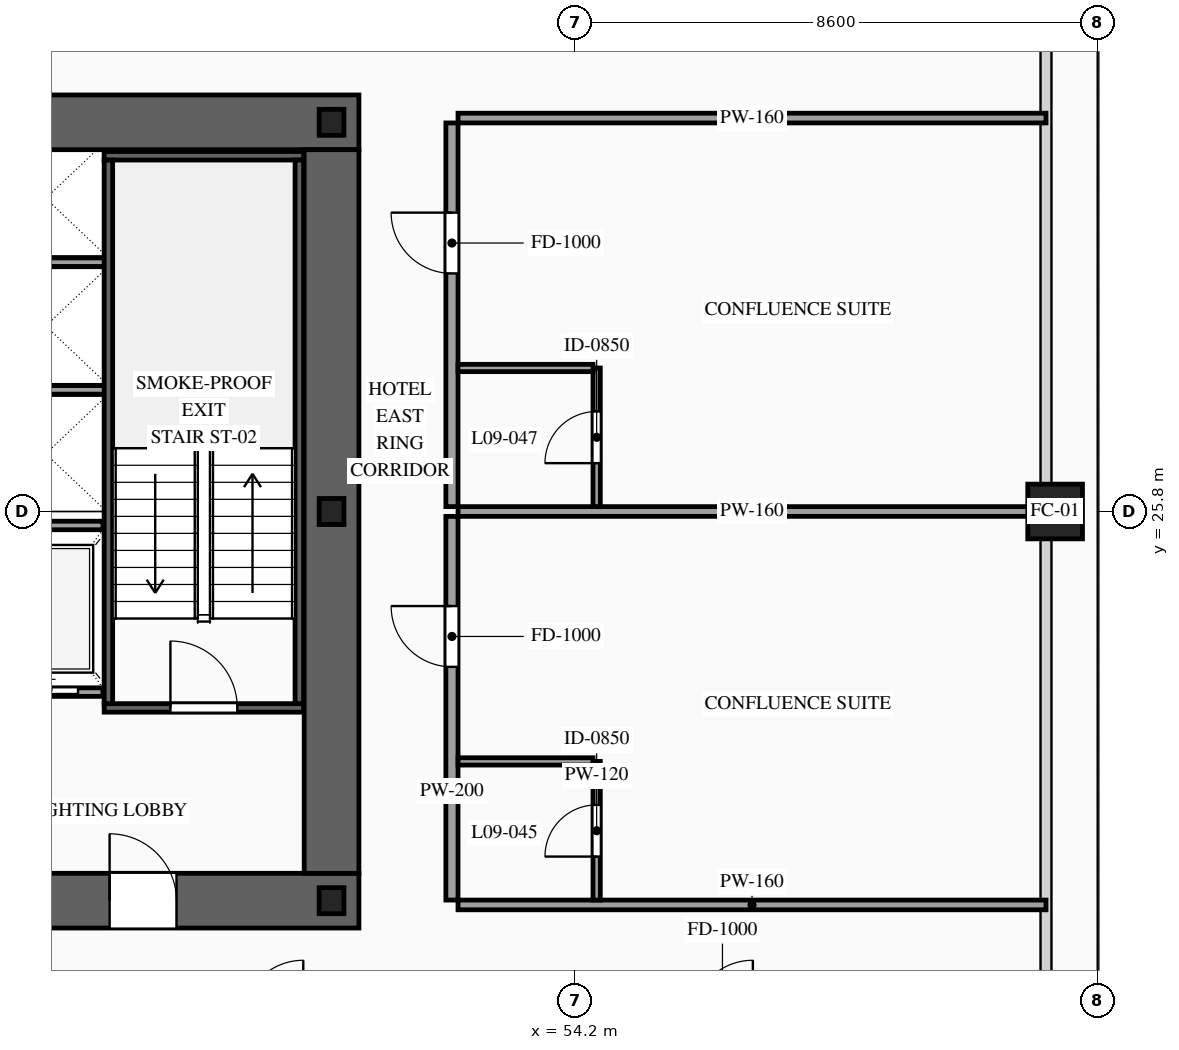
"""IFC4 building model, lengths in metres.
Left out: names, types, materials, properties, quantities, classifications, styles, units other than length and angle.
Written with IfcOpenShell. Run it as: python <this file> out.ifc"""

import sys

from ifc_helpers import new_model, si_unit, direction, frame, frame_2d, origin, origin_2d, place, context, subcontext, project, spatial, rectangle, hollow_rectangle, i_section, extrude, source, transform, mapped, element, fill, save


model = new_model("IFC4")
c1 = context("Model", 3, precision=1e-05, world=origin(), true_north=direction((0.0, 1.0)))
c2 = subcontext(c1, "Body", "Model", "MODEL_VIEW")
j1 = project(units=[si_unit("LENGTHUNIT", "METRE"), si_unit("PLANEANGLEUNIT", "RADIAN")], contexts=[c1])
p1 = place(None, origin())
s1 = spatial("IfcSite", under=j1, at=p1, CompositionType="ELEMENT")
p2 = place(p1, origin())
s2 = spatial("IfcBuilding", under=s1, at=p2, CompositionType="ELEMENT")
p3 = place(p2, frame((0.0, 0.0, 37.8)))
s3 = spatial("IfcBuildingStorey", under=s2, at=p3, CompositionType="ELEMENT", Elevation=37.8)
p4 = place(p3, frame((23.35, 19.4, 0.0), z_axis=(0.0, 0.0, 1.0), x_axis=(1.0, 0.0, 0.0)))
e1 = element("IfcWall", 1, at=p4, inside=s3, PredefinedType="SHEAR", context=c2, shape_type="SweptSolid", body=[
    extrude(rectangle(XDim=27.3, YDim=0.9, at=frame_2d((13.65, 0.0))), origin(), (0.0, 0.0, 1.0), 3.6),
])
p5 = place(p4, frame((2.1, 0.0, 0.0)))
e2 = element("IfcOpeningElement", 2, at=p5, cuts=e1, PredefinedType="OPENING", context=c2, shape_type="SweptSolid", body=[
    extrude(rectangle(XDim=1.1, YDim=2.2, at=frame_2d((0.55, 1.1))), frame((0.0, 0.465, 0.0), z_axis=(0.0, -1.0, 0.0), x_axis=(1.0, 0.0, 0.0)), (0.0, 0.0, 1.0), 0.93),
])
p6 = place(p4, frame((10.0, 0.0, 0.0)))
e3 = element("IfcOpeningElement", 3, at=p6, cuts=e1, PredefinedType="OPENING", context=c2, shape_type="SweptSolid", body=[
    extrude(rectangle(XDim=1.1, YDim=2.2, at=frame_2d((0.55, 1.1))), frame((0.0, 0.465, 0.0), z_axis=(0.0, -1.0, 0.0), x_axis=(1.0, 0.0, 0.0)), (0.0, 0.0, 1.0), 0.93),
])
p7 = place(p4, frame((23.2, 0.0, 0.0)))
e4 = element("IfcOpeningElement", 4, at=p7, cuts=e1, PredefinedType="OPENING", context=c2, shape_type="SweptSolid", body=[
    extrude(rectangle(XDim=1.1, YDim=2.2, at=frame_2d((0.55, 1.1))), frame((0.0, 0.465, 0.0), z_axis=(0.0, -1.0, 0.0), x_axis=(1.0, 0.0, 0.0)), (0.0, 0.0, 1.0), 0.93),
])
p8 = place(p4, frame((19.82, 0.0, 0.0)))
e5 = element("IfcOpeningElement", 5, at=p8, cuts=e1, PredefinedType="OPENING", context=c2, shape_type="SweptSolid", body=[
    extrude(rectangle(XDim=0.9, YDim=2.15, at=frame_2d((0.45, 1.075))), frame((0.0, 0.465, 0.0), z_axis=(0.0, -1.0, 0.0), x_axis=(1.0, 0.0, 0.0)), (0.0, 0.0, 1.0), 0.93),
])
p9 = place(p4, frame((18.38, 0.0, 0.0)))
e6 = element("IfcOpeningElement", 6, at=p9, cuts=e1, PredefinedType="OPENING", context=c2, shape_type="SweptSolid", body=[
    extrude(rectangle(XDim=0.9, YDim=2.15, at=frame_2d((0.45, 1.075))), frame((0.0, 0.465, 0.0), z_axis=(0.0, -1.0, 0.0), x_axis=(1.0, 0.0, 0.0)), (0.0, 0.0, 1.0), 0.93),
])
p10 = place(p3, frame((23.35, 32.2, 0.0), z_axis=(0.0, 0.0, 1.0), x_axis=(1.0, 0.0, 0.0)))
e7 = element("IfcWall", 7, at=p10, inside=s3, PredefinedType="SHEAR", context=c2, shape_type="SweptSolid", body=[
    extrude(rectangle(XDim=27.3, YDim=0.9, at=frame_2d((13.65, 0.0))), origin(), (0.0, 0.0, 1.0), 3.6),
])
p11 = place(p10, frame((4.72, 0.0, 0.0)))
e8 = element("IfcOpeningElement", 8, at=p11, cuts=e7, PredefinedType="OPENING", context=c2, shape_type="SweptSolid", body=[
    extrude(rectangle(XDim=0.9, YDim=2.15, at=frame_2d((0.45, 1.075))), frame((0.0, 0.465, 0.0), z_axis=(0.0, -1.0, 0.0), x_axis=(1.0, 0.0, 0.0)), (0.0, 0.0, 1.0), 0.93),
])
p12 = place(p10, frame((10.0, 0.0, 0.0)))
e9 = element("IfcOpeningElement", 9, at=p12, cuts=e7, PredefinedType="OPENING", context=c2, shape_type="SweptSolid", body=[
    extrude(rectangle(XDim=1.1, YDim=2.2, at=frame_2d((0.55, 1.1))), frame((0.0, 0.465, 0.0), z_axis=(0.0, -1.0, 0.0), x_axis=(1.0, 0.0, 0.0)), (0.0, 0.0, 1.0), 0.93),
])
p13 = place(p10, frame((15.85, 0.0, 0.0)))
e10 = element("IfcOpeningElement", 10, at=p13, cuts=e7, PredefinedType="OPENING", context=c2, shape_type="SweptSolid", body=[
    extrude(rectangle(XDim=1.1, YDim=2.2, at=frame_2d((0.55, 1.1))), frame((0.0, 0.465, 0.0), z_axis=(0.0, -1.0, 0.0), x_axis=(1.0, 0.0, 0.0)), (0.0, 0.0, 1.0), 0.93),
])
m1 = source(origin(), c2, "Body", "SweptSolid", [
    extrude(rectangle(XDim=11.9, YDim=0.9, at=frame_2d((5.95, 0.0))), origin(), (0.0, 0.0, 1.0), 3.6),
])
p14 = place(p3, frame((50.2, 19.85, 0.0), z_axis=(0.0, 0.0, 1.0), x_axis=(0.0, 1.0, 0.0)))
e11 = element("IfcWall", 11, at=p14, inside=s3, PredefinedType="SHEAR", context=c2, shape_type="MappedRepresentation", body=[
    mapped(m1, transform((0.0, 0.0, 0.0), scale=1.0)),
])
m2 = source(origin(), c2, "Body", "SweptSolid", [
    extrude(i_section(OverallWidth=0.407, OverallDepth=0.428, WebThickness=0.02, FlangeThickness=0.035, at=origin_2d()), origin(), (0.0, 0.0, 1.0), 3.6),
])
for number, where, z_axis, x_axis in (
    (12, (50.2, 19.4, 0.0), (0.0, 0.0, 1.0), (1.0, 0.0, 0.0)),
    (13, (50.2, 25.8, 0.0), (0.0, 0.0, 1.0), (1.0, 0.0, 0.0)),
    (14, (50.2, 32.2, 0.0), (0.0, 0.0, 1.0), (1.0, 0.0, 0.0)),
):
    element("IfcColumn", number, at=place(p3, frame(where, z_axis=z_axis, x_axis=x_axis)), inside=s3, PredefinedType="COLUMN", context=c2, shape_type="MappedRepresentation", body=[
        mapped(m2, transform((0.0, 0.0, 0.0), scale=1.0)),
    ])
m3 = source(origin(), c2, "Body", "SweptSolid", [
    extrude(hollow_rectangle(XDim=0.9, YDim=0.9, WallThickness=0.042, at=origin_2d()), origin(), (0.0, 0.0, 1.0), 3.6),
])
p15 = place(p3, frame((62.1, 25.8, 0.0), z_axis=(0.0, 0.0, 1.0), x_axis=(1.0, 0.0, 0.0)))
e15 = element("IfcColumn", 15, at=p15, inside=s3, PredefinedType="COLUMN", context=c2, shape_type="MappedRepresentation", body=[
    mapped(m3, transform((0.0, 0.0, 0.0), scale=1.0)),
])
p16 = place(p3, frame((44.52, 22.83, 0.0), z_axis=(0.0, 0.0, 1.0), x_axis=(1.0, 0.0, 0.0)))
e16 = element("IfcWall", 16, at=p16, inside=s3, PredefinedType="SOLIDWALL", context=c2, shape_type="SweptSolid", body=[
    extrude(rectangle(XDim=1.92, YDim=0.14, at=frame_2d((0.96, 0.0))), origin(), (0.0, 0.0, 1.0), 3.32),
])
p17 = place(p16, frame((0.41, 0.0, 0.0)))
e17 = element("IfcOpeningElement", 17, at=p17, cuts=e16, PredefinedType="OPENING", context=c2, shape_type="SweptSolid", body=[
    extrude(rectangle(XDim=1.1, YDim=2.2, at=frame_2d((0.55, 1.1))), frame((0.0, 0.085, 0.0), z_axis=(0.0, -1.0, 0.0), x_axis=(1.0, 0.0, 0.0)), (0.0, 0.0, 1.0), 0.17),
])
m4 = source(origin(), c2, "Body", "SweptSolid", [
    extrude(rectangle(XDim=1.92, YDim=0.14, at=frame_2d((0.96, 0.0))), origin(), (0.0, 0.0, 1.0), 3.32),
])
p18 = place(p3, frame((44.52, 25.57, 0.0), z_axis=(0.0, 0.0, 1.0), x_axis=(1.0, 0.0, 0.0)))
e18 = element("IfcWall", 18, at=p18, inside=s3, PredefinedType="SOLIDWALL", context=c2, shape_type="MappedRepresentation", body=[
    mapped(m4, transform((0.0, 0.0, 0.0), scale=1.0)),
])
m5 = source(origin(), c2, "Body", "SweptSolid", [
    extrude(rectangle(XDim=2.0, YDim=0.14, at=frame_2d((1.0, 0.0))), origin(), (0.0, 0.0, 1.0), 3.32),
])
for number, where, z_axis, x_axis in (
    (19, (44.5, 27.8, 0.0), (0.0, 0.0, 1.0), (1.0, 0.0, 0.0)),
    (20, (44.5, 29.9, 0.0), (0.0, 0.0, 1.0), (1.0, 0.0, 0.0)),
):
    element("IfcWall", number, at=place(p3, frame(where, z_axis=z_axis, x_axis=x_axis)), inside=s3, PredefinedType="SOLIDWALL", context=c2, shape_type="MappedRepresentation", body=[
        mapped(m5, transform((0.0, 0.0, 0.0), scale=1.0)),
    ])
p19 = place(p3, frame((46.46, 22.57, 0.0), z_axis=(0.0, 0.0, 1.0), x_axis=(1.0, 0.0, 0.0)))
e21 = element("IfcWall", 21, at=p19, inside=s3, PredefinedType="SOLIDWALL", context=c2, shape_type="SweptSolid", body=[
    extrude(rectangle(XDim=3.28, YDim=0.14, at=frame_2d((1.64, 0.0))), origin(), (0.0, 0.0, 1.0), 3.32),
])
p20 = place(p19, frame((1.09, 0.0, 0.0)))
e22 = element("IfcOpeningElement", 22, at=p20, cuts=e21, PredefinedType="OPENING", context=c2, shape_type="SweptSolid", body=[
    extrude(rectangle(XDim=1.1, YDim=2.2, at=frame_2d((0.55, 1.1))), frame((0.0, 0.085, 0.0), z_axis=(0.0, -1.0, 0.0), x_axis=(1.0, 0.0, 0.0)), (0.0, 0.0, 1.0), 0.17),
])
m6 = source(origin(), c2, "Body", "SweptSolid", [
    extrude(rectangle(XDim=3.28, YDim=0.14, at=frame_2d((1.64, 0.0))), origin(), (0.0, 0.0, 1.0), 3.32),
])
p21 = place(p3, frame((46.46, 31.65, 0.0), z_axis=(0.0, 0.0, 1.0), x_axis=(1.0, 0.0, 0.0)))
e23 = element("IfcWall", 23, at=p21, inside=s3, PredefinedType="SOLIDWALL", context=c2, shape_type="MappedRepresentation", body=[
    mapped(m6, transform((0.0, 0.0, 0.0), scale=1.0)),
])
m7 = source(origin(), c2, "Body", "SweptSolid", [
    extrude(rectangle(XDim=8.94, YDim=0.14, at=frame_2d((4.47, 0.0))), origin(), (0.0, 0.0, 1.0), 3.32),
])
for number, where, z_axis, x_axis in (
    (24, (46.53, 22.64, 0.0), (0.0, 0.0, 1.0), (0.0, 1.0, 0.0)),
    (25, (49.67, 22.64, 0.0), (0.0, 0.0, 1.0), (0.0, 1.0, 0.0)),
):
    element("IfcWall", number, at=place(p3, frame(where, z_axis=z_axis, x_axis=x_axis)), inside=s3, PredefinedType="SOLIDWALL", context=c2, shape_type="MappedRepresentation", body=[
        mapped(m7, transform((0.0, 0.0, 0.0), scale=1.0)),
    ])
p22 = place(p3, frame((52.18, 19.41, 0.0), z_axis=(0.0, 0.0, 1.0), x_axis=(0.0, 1.0, 0.0)))
e26 = element("IfcWall", 26, at=p22, inside=s3, PredefinedType="PARTITIONING", context=c2, shape_type="SweptSolid", body=[
    extrude(rectangle(XDim=6.31, YDim=0.2, at=frame_2d((3.155, 0.0))), origin(), (0.0, 0.0, 1.0), 3.32),
])
p23 = place(p22, frame((3.835, 0.0, 0.0)))
e27 = element("IfcOpeningElement", 27, at=p23, cuts=e26, PredefinedType="OPENING", context=c2, shape_type="SweptSolid", body=[
    extrude(rectangle(XDim=1.0, YDim=2.2, at=frame_2d((0.5, 1.1))), frame((0.0, 0.115, 0.0), z_axis=(0.0, -1.0, 0.0), x_axis=(1.0, 0.0, 0.0)), (0.0, 0.0, 1.0), 0.23),
])
m8 = source(origin(), c2, "Body", "SweptSolid", [
    extrude(rectangle(XDim=9.67, YDim=0.16, at=frame_2d((4.835, 0.0))), origin(), (0.0, 0.0, 1.0), 2.515),
])
p24 = place(p3, frame((52.28, 25.8, 0.0), z_axis=(0.0, 0.0, 1.0), x_axis=(1.0, 0.0, 0.0)))
e28 = element("IfcWall", 28, at=p24, inside=s3, PredefinedType="PARTITIONING", context=c2, shape_type="MappedRepresentation", body=[
    mapped(m8, transform((0.0, 0.0, 0.0), scale=1.0)),
])
m9 = source(origin(), c2, "Body", "SweptSolid", [
    extrude(rectangle(XDim=9.67, YDim=0.16, at=frame_2d((4.835, 0.0))), origin(), (0.0, 0.0, 1.0), 2.815),
])
p25 = place(p3, frame((52.28, 19.33, 0.0), z_axis=(0.0, 0.0, 1.0), x_axis=(1.0, 0.0, 0.0)))
e29 = element("IfcWall", 29, at=p25, inside=s3, PredefinedType="PARTITIONING", context=c2, shape_type="MappedRepresentation", body=[
    mapped(m9, transform((0.0, 0.0, 0.0), scale=1.0)),
])
p26 = place(p3, frame((54.56, 19.41, 0.0), z_axis=(0.0, 0.0, 1.0), x_axis=(0.0, 1.0, 0.0)))
e30 = element("IfcWall", 30, at=p26, inside=s3, PredefinedType="PARTITIONING", context=c2, shape_type="SweptSolid", body=[
    extrude(rectangle(XDim=2.28, YDim=0.12, at=frame_2d((1.14, 0.0))), origin(), (0.0, 0.0, 1.0), 3.32),
])
p27 = place(p26, frame((0.715, 0.0, 0.0)))
e31 = element("IfcOpeningElement", 31, at=p27, cuts=e30, PredefinedType="OPENING", context=c2, shape_type="SweptSolid", body=[
    extrude(rectangle(XDim=0.85, YDim=2.1, at=frame_2d((0.425, 1.05))), frame((0.0, 0.075, 0.0), z_axis=(0.0, -1.0, 0.0), x_axis=(1.0, 0.0, 0.0)), (0.0, 0.0, 1.0), 0.15),
])
m10 = source(origin(), c2, "Body", "SweptSolid", [
    extrude(rectangle(XDim=2.22, YDim=0.12, at=frame_2d((1.11, 0.0))), origin(), (0.0, 0.0, 1.0), 3.32),
])
p28 = place(p3, frame((52.28, 21.69, 0.0), z_axis=(0.0, 0.0, 1.0), x_axis=(1.0, 0.0, 0.0)))
e32 = element("IfcWall", 32, at=p28, inside=s3, PredefinedType="PARTITIONING", context=c2, shape_type="MappedRepresentation", body=[
    mapped(m10, transform((0.0, 0.0, 0.0), scale=1.0)),
])
p29 = place(p3, frame((52.18, 25.88, 0.0), z_axis=(0.0, 0.0, 1.0), x_axis=(0.0, 1.0, 0.0)))
e33 = element("IfcWall", 33, at=p29, inside=s3, PredefinedType="PARTITIONING", context=c2, shape_type="SweptSolid", body=[
    extrude(rectangle(XDim=6.31, YDim=0.2, at=frame_2d((3.155, 0.0))), origin(), (0.0, 0.0, 1.0), 3.32),
])
p30 = place(p29, frame((3.835, 0.0, 0.0)))
e34 = element("IfcOpeningElement", 34, at=p30, cuts=e33, PredefinedType="OPENING", context=c2, shape_type="SweptSolid", body=[
    extrude(rectangle(XDim=1.0, YDim=2.2, at=frame_2d((0.5, 1.1))), frame((0.0, 0.115, 0.0), z_axis=(0.0, -1.0, 0.0), x_axis=(1.0, 0.0, 0.0)), (0.0, 0.0, 1.0), 0.23),
])
p31 = place(p3, frame((52.28, 32.27, 0.0), z_axis=(0.0, 0.0, 1.0), x_axis=(1.0, 0.0, 0.0)))
e35 = element("IfcWall", 35, at=p31, inside=s3, PredefinedType="PARTITIONING", context=c2, shape_type="MappedRepresentation", body=[
    mapped(m9, transform((0.0, 0.0, 0.0), scale=1.0)),
])
p32 = place(p3, frame((54.56, 25.88, 0.0), z_axis=(0.0, 0.0, 1.0), x_axis=(0.0, 1.0, 0.0)))
e36 = element("IfcWall", 36, at=p32, inside=s3, PredefinedType="PARTITIONING", context=c2, shape_type="SweptSolid", body=[
    extrude(rectangle(XDim=2.28, YDim=0.12, at=frame_2d((1.14, 0.0))), origin(), (0.0, 0.0, 1.0), 3.32),
])
p33 = place(p32, frame((0.715, 0.0, 0.0)))
e37 = element("IfcOpeningElement", 37, at=p33, cuts=e36, PredefinedType="OPENING", context=c2, shape_type="SweptSolid", body=[
    extrude(rectangle(XDim=0.85, YDim=2.1, at=frame_2d((0.425, 1.05))), frame((0.0, 0.075, 0.0), z_axis=(0.0, -1.0, 0.0), x_axis=(1.0, 0.0, 0.0)), (0.0, 0.0, 1.0), 0.15),
])
p34 = place(p3, frame((52.28, 28.16, 0.0), z_axis=(0.0, 0.0, 1.0), x_axis=(1.0, 0.0, 0.0)))
e38 = element("IfcWall", 38, at=p34, inside=s3, PredefinedType="PARTITIONING", context=c2, shape_type="MappedRepresentation", body=[
    mapped(m10, transform((0.0, 0.0, 0.0), scale=1.0)),
])
m11 = source(origin(), c2, "Body", "SweptSolid", [
    extrude(rectangle(XDim=1.1, YDim=2.2, at=frame_2d((0.55, 1.1))), frame((0.0, 0.025, 0.0), z_axis=(0.0, -1.0, 0.0), x_axis=(1.0, 0.0, 0.0)), (0.0, 0.0, 1.0), 0.05),
])
p35 = place(p17, origin())
e39 = element("IfcDoor", 39, at=p35, inside=s3, OperationType="SLIDING_TO_RIGHT", PredefinedType="DOOR", context=c2, shape_type="MappedRepresentation", body=[
    mapped(m11, transform((0.0, 0.0, 0.0), scale=1.0)),
])
fill(e17, e39)
m12 = source(origin(), c2, "Body", "SweptSolid", [
    extrude(rectangle(XDim=1.1, YDim=2.2, at=frame_2d((0.55, 1.1))), frame((0.0, 0.025, 0.0), z_axis=(0.0, -1.0, 0.0), x_axis=(1.0, 0.0, 0.0)), (0.0, 0.0, 1.0), 0.05),
])
p36 = place(p20, origin())
e40 = element("IfcDoor", 40, at=p36, inside=s3, OperationType="SINGLE_SWING_LEFT", PredefinedType="DOOR", context=c2, shape_type="MappedRepresentation", body=[
    mapped(m12, transform((0.0, 0.0, 0.0), scale=1.0)),
])
fill(e22, e40)
p37 = place(p7, origin())
e41 = element("IfcDoor", 41, at=p37, inside=s3, OperationType="SINGLE_SWING_LEFT", PredefinedType="DOOR", context=c2, shape_type="MappedRepresentation", body=[
    mapped(m12, transform((0.0, 0.0, 0.0), scale=1.0)),
])
fill(e4, e41)
m13 = source(origin(), c2, "Body", "SweptSolid", [
    extrude(rectangle(XDim=1.0, YDim=2.2, at=frame_2d((0.5, 1.1))), frame((0.0, 0.025, 0.0), z_axis=(0.0, -1.0, 0.0), x_axis=(1.0, 0.0, 0.0)), (0.0, 0.0, 1.0), 0.05),
])
p38 = place(p23, origin())
e42 = element("IfcDoor", 42, at=p38, inside=s3, OperationType="SINGLE_SWING_RIGHT", PredefinedType="DOOR", context=c2, shape_type="MappedRepresentation", body=[
    mapped(m13, transform((0.0, 0.0, 0.0), scale=1.0)),
])
fill(e27, e42)
m14 = source(origin(), c2, "Body", "SweptSolid", [
    extrude(rectangle(XDim=0.85, YDim=2.1, at=frame_2d((0.425, 1.05))), frame((0.0, 0.025, 0.0), z_axis=(0.0, -1.0, 0.0), x_axis=(1.0, 0.0, 0.0)), (0.0, 0.0, 1.0), 0.05),
])
p39 = place(p27, origin())
e43 = element("IfcDoor", 43, at=p39, inside=s3, OperationType="SINGLE_SWING_LEFT", PredefinedType="DOOR", context=c2, shape_type="MappedRepresentation", body=[
    mapped(m14, transform((0.0, 0.0, 0.0), scale=1.0)),
])
fill(e31, e43)
p40 = place(p30, origin())
e44 = element("IfcDoor", 44, at=p40, inside=s3, OperationType="SINGLE_SWING_RIGHT", PredefinedType="DOOR", context=c2, shape_type="MappedRepresentation", body=[
    mapped(m13, transform((0.0, 0.0, 0.0), scale=1.0)),
])
fill(e34, e44)
p41 = place(p33, origin())
e45 = element("IfcDoor", 45, at=p41, inside=s3, OperationType="SINGLE_SWING_LEFT", PredefinedType="DOOR", context=c2, shape_type="MappedRepresentation", body=[
    mapped(m14, transform((0.0, 0.0, 0.0), scale=1.0)),
])
fill(e37, e45)
save(model, sys.argv[1])
